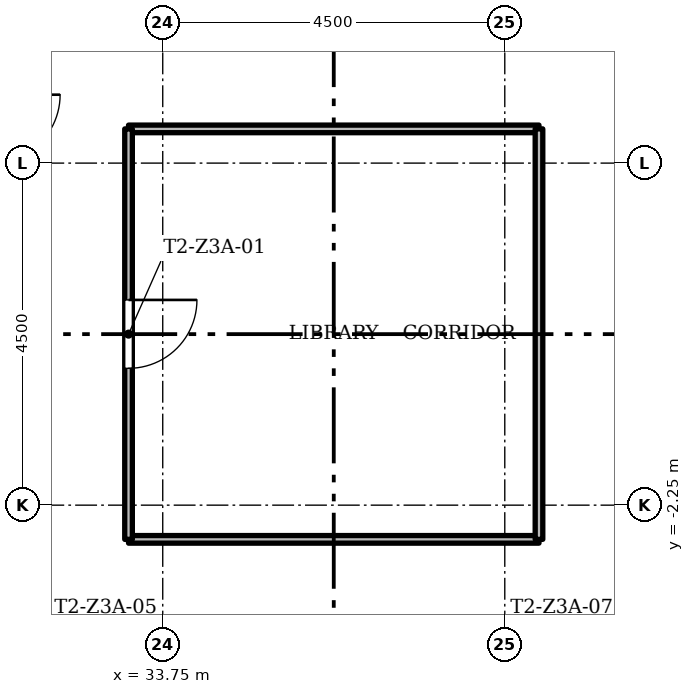
"""IFC4 building model, lengths in metres.
Left out: names, types, materials, properties, quantities, classifications, styles, units other than length and angle.
Written with IfcOpenShell. Run it as: python <this file> out.ifc"""

import sys

from ifc_helpers import new_model, si_unit, direction, frame, frame_2d, origin, place, context, subcontext, project, spatial, rectangle, extrude, element, fill, save


model = new_model("IFC4")
c1 = context("Model", 3, precision=1e-05, world=origin(), true_north=direction((0.0, 1.0)))
c2 = subcontext(c1, "Body", "Model", "MODEL_VIEW")
j1 = project(units=[si_unit("LENGTHUNIT", "METRE"), si_unit("PLANEANGLEUNIT", "RADIAN")], contexts=[c1])
p1 = place(None, origin())
s1 = spatial("IfcSite", under=j1, at=p1, CompositionType="ELEMENT")
p2 = place(p1, origin())
s2 = spatial("IfcBuilding", under=s1, at=p2, CompositionType="ELEMENT")
p3 = place(p2, frame((0.0, 0.0, 133.7)))
s3 = spatial("IfcBuildingStorey", under=s2, at=p3, CompositionType="ELEMENT", Elevation=133.7)
for number, where, z_axis, x_axis in (
    (1, (38.7, -2.7, 0.0), (0.0, 0.0, 1.0), (-1.0, 0.0, 0.0)),
    (2, (38.7, 2.7, 0.0), (0.0, 0.0, 1.0), (-1.0, 0.0, 0.0)),
    (3, (38.7, -2.7, 0.0), (0.0, 0.0, 1.0), (0.0, 1.0, 0.0)),
):
    element("IfcWall", number, at=place(p3, frame(where, z_axis=z_axis, x_axis=x_axis)), inside=s3, PredefinedType="PARTITIONING", context=c2, shape_type="SweptSolid", body=[
        extrude(rectangle(XDim=5.4, YDim=0.1, at=frame_2d((2.7, 0.0))), origin(), (0.0, 0.0, 1.0), 3.0),
    ])
p4 = place(p3, frame((33.3, -2.7, 0.0), z_axis=(0.0, 0.0, 1.0), x_axis=(0.0, 1.0, 0.0)))
e4 = element("IfcWall", 4, at=p4, inside=s3, PredefinedType="PARTITIONING", context=c2, shape_type="SweptSolid", body=[
    extrude(rectangle(XDim=5.4, YDim=0.1, at=frame_2d((2.7, 0.0))), origin(), (0.0, 0.0, 1.0), 3.0),
])
p5 = place(p4, frame((2.25, 0.0, 0.0)))
e5 = element("IfcOpeningElement", 5, at=p5, cuts=e4, PredefinedType="OPENING", context=c2, shape_type="SweptSolid", body=[
    extrude(rectangle(XDim=0.9, YDim=2.1, at=frame_2d((0.45, 1.05))), frame((0.0, 0.06, 0.0), z_axis=(0.0, -1.0, 0.0), x_axis=(1.0, 0.0, 0.0)), (0.0, 0.0, 1.0), 0.12),
])
p6 = place(p5, origin())
e6 = element("IfcDoor", 6, at=p6, inside=s3, OperationType="SINGLE_SWING_RIGHT", PredefinedType="DOOR", context=c2, shape_type="SweptSolid", body=[
    extrude(rectangle(XDim=0.9, YDim=2.1, at=frame_2d((0.45, 1.05))), frame((0.0, 0.025, 0.0), z_axis=(0.0, -1.0, 0.0), x_axis=(1.0, 0.0, 0.0)), (0.0, 0.0, 1.0), 0.05),
])
fill(e5, e6)
save(model, sys.argv[1])
